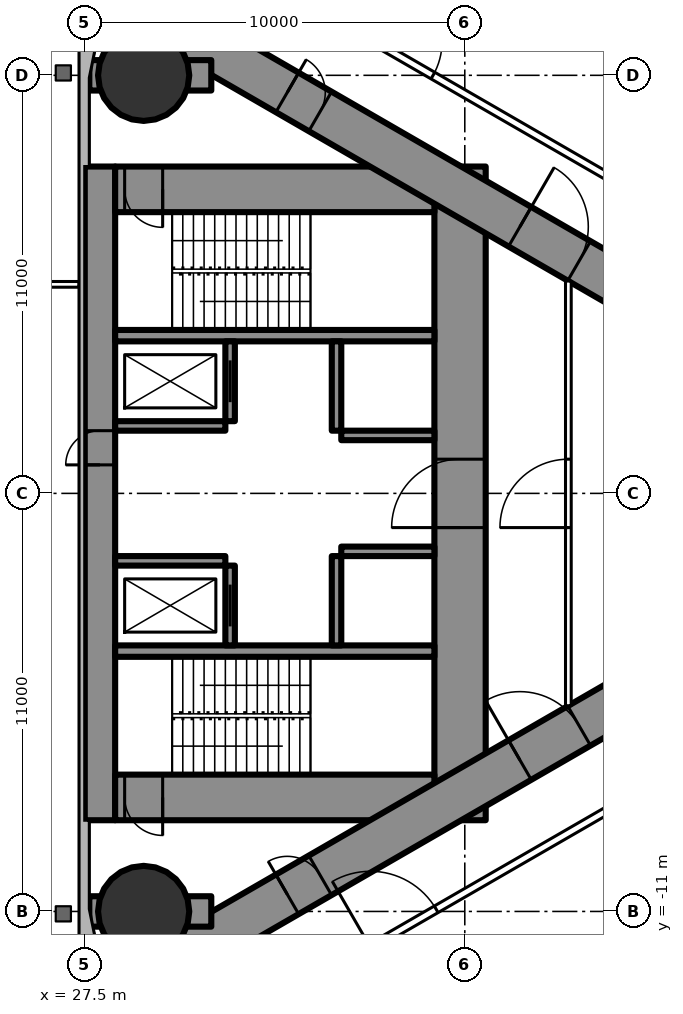
"""IFC4 building model, lengths in metres.
Left out: names, types, materials, properties, quantities, classifications, styles, units other than length and angle.
Written with IfcOpenShell. Run it as: python <this file> out.ifc"""

import sys

from ifc_helpers import new_model, si_unit, direction, frame, frame_2d, origin, origin_2d, place, context, subcontext, project, spatial, rectangle, hollow_circle, extrude, element, fill, save


model = new_model("IFC4")
c1 = context("Model", 3, precision=1e-05, world=origin(), true_north=direction((0.0, 1.0)))
c2 = subcontext(c1, "Body", "Model", "MODEL_VIEW")
j1 = project(units=[si_unit("LENGTHUNIT", "METRE"), si_unit("PLANEANGLEUNIT", "RADIAN")], contexts=[c1])
p1 = place(None, origin())
s1 = spatial("IfcSite", under=j1, at=p1, CompositionType="ELEMENT")
p2 = place(p1, origin())
s2 = spatial("IfcBuilding", under=s1, at=p2, CompositionType="ELEMENT")
p3 = place(p2, frame((0.0, 0.0, 210.3)))
s3 = spatial("IfcBuildingStorey", under=s2, at=p3, CompositionType="ELEMENT", Elevation=210.3)
for number, where, z_axis, x_axis in (
    (1, (29.05, 11.0, 0.0), (0.0, 0.0, 1.0), (1.0, 0.0, 0.0)),
    (2, (29.05, -11.0, 0.0), (0.0, 0.0, 1.0), (1.0, 0.0, 0.0)),
):
    element("IfcColumn", number, at=place(p3, frame(where, z_axis=z_axis, x_axis=x_axis)), inside=s3, PredefinedType="COLUMN", context=c2, shape_type="SweptSolid", body=[
        extrude(hollow_circle(Radius=1.2, WallThickness=0.09, at=origin_2d()), origin(), (0.0, 0.0, 1.0), 5.0),
    ])
p4 = place(p3, frame((27.9, -8.6, 0.0), z_axis=(0.0, 0.0, 1.0), x_axis=(0.0, 1.0, 0.0)))
e3 = element("IfcWall", 3, at=p4, inside=s3, PredefinedType="SHEAR", context=c2, shape_type="SweptSolid", body=[
    extrude(rectangle(XDim=17.2, YDim=0.8, at=frame_2d((8.6, 0.0))), origin(), (0.0, 0.0, 1.0), 5.0),
])
p5 = place(p4, frame((9.35, 0.0, 0.0)))
e4 = element("IfcOpeningElement", 4, at=p5, cuts=e3, PredefinedType="OPENING", context=c2, shape_type="SweptSolid", body=[
    extrude(rectangle(XDim=0.9, YDim=2.2, at=frame_2d((0.45, 1.1))), frame((0.0, 0.41, 0.0), z_axis=(0.0, -1.0, 0.0), x_axis=(1.0, 0.0, 0.0)), (0.0, 0.0, 1.0), 0.82),
])
p6 = place(p3, frame((37.375, -8.6, 0.0), z_axis=(0.0, 0.0, 1.0), x_axis=(0.0, 1.0, 0.0)))
e5 = element("IfcWall", 5, at=p6, inside=s3, PredefinedType="SHEAR", context=c2, shape_type="SweptSolid", body=[
    extrude(rectangle(XDim=17.2, YDim=1.35, at=frame_2d((8.6, 0.0))), origin(), (0.0, 0.0, 1.0), 5.0),
])
p7 = place(p6, frame((7.7, 0.0, 0.0)))
e6 = element("IfcOpeningElement", 6, at=p7, cuts=e5, PredefinedType="OPENING", context=c2, shape_type="SweptSolid", body=[
    extrude(rectangle(XDim=1.8, YDim=2.2, at=frame_2d((0.9, 1.1))), frame((0.0, 0.685, 0.0), z_axis=(0.0, -1.0, 0.0), x_axis=(1.0, 0.0, 0.0)), (0.0, 0.0, 1.0), 1.37),
])
p8 = place(p3, frame((28.3, -8.0, 0.0), z_axis=(0.0, 0.0, 1.0), x_axis=(1.0, 0.0, 0.0)))
e7 = element("IfcWall", 7, at=p8, inside=s3, PredefinedType="SHEAR", context=c2, shape_type="SweptSolid", body=[
    extrude(rectangle(XDim=8.4, YDim=1.2, at=frame_2d((4.2, 0.0))), origin(), (0.0, 0.0, 1.0), 5.0),
])
p9 = place(p8, frame((0.25, 0.0, 0.0)))
e8 = element("IfcOpeningElement", 8, at=p9, cuts=e7, PredefinedType="OPENING", context=c2, shape_type="SweptSolid", body=[
    extrude(rectangle(XDim=1.0, YDim=2.2, at=frame_2d((0.5, 1.1))), frame((0.0, 0.61, 0.0), z_axis=(0.0, -1.0, 0.0), x_axis=(1.0, 0.0, 0.0)), (0.0, 0.0, 1.0), 1.22),
])
p10 = place(p3, frame((28.3, 8.0, 0.0), z_axis=(0.0, 0.0, 1.0), x_axis=(1.0, 0.0, 0.0)))
e9 = element("IfcWall", 9, at=p10, inside=s3, PredefinedType="SHEAR", context=c2, shape_type="SweptSolid", body=[
    extrude(rectangle(XDim=8.4, YDim=1.2, at=frame_2d((4.2, 0.0))), origin(), (0.0, 0.0, 1.0), 5.0),
])
p11 = place(p10, frame((0.25, 0.0, 0.0)))
e10 = element("IfcOpeningElement", 10, at=p11, cuts=e9, PredefinedType="OPENING", context=c2, shape_type="SweptSolid", body=[
    extrude(rectangle(XDim=1.0, YDim=2.2, at=frame_2d((0.5, 1.1))), frame((0.0, 0.61, 0.0), z_axis=(0.0, -1.0, 0.0), x_axis=(1.0, 0.0, 0.0)), (0.0, 0.0, 1.0), 1.22),
])
for number, where, z_axis, x_axis in (
    (11, (28.3, -4.15, 0.0), (0.0, 0.0, 1.0), (1.0, 0.0, 0.0)),
    (12, (28.3, 4.15, 0.0), (0.0, 0.0, 1.0), (1.0, 0.0, 0.0)),
):
    element("IfcWall", number, at=place(p3, frame(where, z_axis=z_axis, x_axis=x_axis)), inside=s3, PredefinedType="SHEAR", context=c2, shape_type="SweptSolid", body=[
        extrude(rectangle(XDim=8.4, YDim=0.3, at=frame_2d((4.2, 0.0))), origin(), (0.0, 0.0, 1.0), 5.0),
    ])
p12 = place(p3, frame((31.325, -4.0, 0.0), z_axis=(0.0, 0.0, 1.0), x_axis=(0.0, 1.0, 0.0)))
e13 = element("IfcWall", 13, at=p12, inside=s3, PredefinedType="SHEAR", context=c2, shape_type="SweptSolid", body=[
    extrude(rectangle(XDim=2.1, YDim=0.25, at=frame_2d((1.05, 0.0))), origin(), (0.0, 0.0, 1.0), 5.0),
])
p13 = place(p12, frame((0.5, 0.0, 0.0)))
e14 = element("IfcOpeningElement", 14, at=p13, cuts=e13, PredefinedType="OPENING", context=c2, shape_type="SweptSolid", body=[
    extrude(rectangle(XDim=1.1, YDim=2.2, at=frame_2d((0.55, 1.1))), frame((0.0, 0.135, 0.0), z_axis=(0.0, -1.0, 0.0), x_axis=(1.0, 0.0, 0.0)), (0.0, 0.0, 1.0), 0.27),
])
p14 = place(p3, frame((34.125, -4.0, 0.0), z_axis=(0.0, 0.0, 1.0), x_axis=(0.0, 1.0, 0.0)))
e15 = element("IfcWall", 15, at=p14, inside=s3, PredefinedType="SHEAR", context=c2, shape_type="SweptSolid", body=[
    extrude(rectangle(XDim=2.35, YDim=0.25, at=frame_2d((1.175, 0.0))), origin(), (0.0, 0.0, 1.0), 5.0),
])
p15 = place(p3, frame((28.3, -1.775, 0.0), z_axis=(0.0, 0.0, 1.0), x_axis=(1.0, 0.0, 0.0)))
e16 = element("IfcWall", 16, at=p15, inside=s3, PredefinedType="SHEAR", context=c2, shape_type="SweptSolid", body=[
    extrude(rectangle(XDim=2.9, YDim=0.25, at=frame_2d((1.45, 0.0))), origin(), (0.0, 0.0, 1.0), 5.0),
])
p16 = place(p3, frame((34.25, -1.525, 0.0), z_axis=(0.0, 0.0, 1.0), x_axis=(1.0, 0.0, 0.0)))
e17 = element("IfcWall", 17, at=p16, inside=s3, PredefinedType="SHEAR", context=c2, shape_type="SweptSolid", body=[
    extrude(rectangle(XDim=2.45, YDim=0.25, at=frame_2d((1.225, 0.0))), origin(), (0.0, 0.0, 1.0), 5.0),
])
p17 = place(p3, frame((31.325, 1.9, 0.0), z_axis=(0.0, 0.0, 1.0), x_axis=(0.0, 1.0, 0.0)))
e18 = element("IfcWall", 18, at=p17, inside=s3, PredefinedType="SHEAR", context=c2, shape_type="SweptSolid", body=[
    extrude(rectangle(XDim=2.1, YDim=0.25, at=frame_2d((1.05, 0.0))), origin(), (0.0, 0.0, 1.0), 5.0),
])
p18 = place(p17, frame((0.5, 0.0, 0.0)))
e19 = element("IfcOpeningElement", 19, at=p18, cuts=e18, PredefinedType="OPENING", context=c2, shape_type="SweptSolid", body=[
    extrude(rectangle(XDim=1.1, YDim=2.2, at=frame_2d((0.55, 1.1))), frame((0.0, 0.135, 0.0), z_axis=(0.0, -1.0, 0.0), x_axis=(1.0, 0.0, 0.0)), (0.0, 0.0, 1.0), 0.27),
])
p19 = place(p3, frame((34.125, 1.65, 0.0), z_axis=(0.0, 0.0, 1.0), x_axis=(0.0, 1.0, 0.0)))
e20 = element("IfcWall", 20, at=p19, inside=s3, PredefinedType="SHEAR", context=c2, shape_type="SweptSolid", body=[
    extrude(rectangle(XDim=2.35, YDim=0.25, at=frame_2d((1.175, 0.0))), origin(), (0.0, 0.0, 1.0), 5.0),
])
p20 = place(p3, frame((28.3, 1.775, 0.0), z_axis=(0.0, 0.0, 1.0), x_axis=(1.0, 0.0, 0.0)))
e21 = element("IfcWall", 21, at=p20, inside=s3, PredefinedType="SHEAR", context=c2, shape_type="SweptSolid", body=[
    extrude(rectangle(XDim=2.9, YDim=0.25, at=frame_2d((1.45, 0.0))), origin(), (0.0, 0.0, 1.0), 5.0),
])
p21 = place(p3, frame((34.25, 1.525, 0.0), z_axis=(0.0, 0.0, 1.0), x_axis=(1.0, 0.0, 0.0)))
e22 = element("IfcWall", 22, at=p21, inside=s3, PredefinedType="SHEAR", context=c2, shape_type="SweptSolid", body=[
    extrude(rectangle(XDim=2.45, YDim=0.25, at=frame_2d((1.225, 0.0))), origin(), (0.0, 0.0, 1.0), 5.0),
])
p22 = place(p3, frame((27.2, -13.8, 0.0), z_axis=(0.0, 0.0, 1.0), x_axis=(0.866027159892, 0.499996958321, 0.0)))
e23 = element("IfcWall", 23, at=p22, inside=s3, PredefinedType="SHEAR", context=c2, shape_type="SweptSolid", body=[
    extrude(rectangle(XDim=27.947, YDim=1.2, at=frame_2d((13.973, 0.0))), origin(), (0.0, 0.0, 1.0), 5.0),
])
p23 = place(p22, frame((6.5, 0.0, 0.0)))
e24 = element("IfcOpeningElement", 24, at=p23, cuts=e23, PredefinedType="OPENING", context=c2, shape_type="SweptSolid", body=[
    extrude(rectangle(XDim=1.0, YDim=2.2, at=frame_2d((0.5, 1.1))), frame((0.0, 0.61, 0.0), z_axis=(0.0, -1.0, 0.0), x_axis=(1.0, 0.0, 0.0)), (0.0, 0.0, 1.0), 1.22),
])
p24 = place(p22, frame((13.568, 0.0, 0.0)))
e25 = element("IfcOpeningElement", 25, at=p24, cuts=e23, PredefinedType="OPENING", context=c2, shape_type="SweptSolid", body=[
    extrude(rectangle(XDim=1.8, YDim=2.2, at=frame_2d((0.9, 1.1))), frame((0.0, 0.61, 0.0), z_axis=(0.0, -1.0, 0.0), x_axis=(1.0, 0.0, 0.0)), (0.0, 0.0, 1.0), 1.22),
])
p25 = place(p3, frame((27.2, 13.8, 0.0), z_axis=(0.0, 0.0, 1.0), x_axis=(0.866024515034, -0.500001539357, 0.0)))
e26 = element("IfcWall", 26, at=p25, inside=s3, PredefinedType="SHEAR", context=c2, shape_type="SweptSolid", body=[
    extrude(rectangle(XDim=26.907, YDim=1.2, at=frame_2d((13.454, 0.0))), origin(), (0.0, 0.0, 1.0), 5.0),
])
p26 = place(p25, frame((6.5, 0.0, 0.0)))
e27 = element("IfcOpeningElement", 27, at=p26, cuts=e26, PredefinedType="OPENING", context=c2, shape_type="SweptSolid", body=[
    extrude(rectangle(XDim=1.0, YDim=2.2, at=frame_2d((0.5, 1.1))), frame((0.0, 0.61, 0.0), z_axis=(0.0, -1.0, 0.0), x_axis=(1.0, 0.0, 0.0)), (0.0, 0.0, 1.0), 1.22),
])
p27 = place(p25, frame((13.568, 0.0, 0.0)))
e28 = element("IfcOpeningElement", 28, at=p27, cuts=e26, PredefinedType="OPENING", context=c2, shape_type="SweptSolid", body=[
    extrude(rectangle(XDim=1.8, YDim=2.2, at=frame_2d((0.9, 1.1))), frame((0.0, 0.61, 0.0), z_axis=(0.0, -1.0, 0.0), x_axis=(1.0, 0.0, 0.0)), (0.0, 0.0, 1.0), 1.22),
])
for number, where, z_axis, x_axis in (
    (29, (27.62, -11.0, 0.0), (0.0, 0.0, 1.0), (1.0, 0.0, 0.0)),
    (30, (27.62, 11.0, 0.0), (0.0, 0.0, 1.0), (1.0, 0.0, 0.0)),
):
    element("IfcWall", number, at=place(p3, frame(where, z_axis=z_axis, x_axis=x_axis)), inside=s3, PredefinedType="SHEAR", context=c2, shape_type="SweptSolid", body=[
        extrude(rectangle(XDim=3.209, YDim=0.8, at=frame_2d((1.605, 0.0))), origin(), (0.0, 0.0, 1.0), 5.0),
    ])
p28 = place(p3, frame((28.959, -15.44, 0.0), z_axis=(0.0, 0.0, 1.0), x_axis=(0.866025227435, 0.500000305447, 0.0)))
e31 = element("IfcWall", 31, at=p28, inside=s3, PredefinedType="PARTITIONING", context=c2, shape_type="SweptSolid", body=[
    extrude(rectangle(XDim=30.88, YDim=0.2, at=frame_2d((15.44, 0.0))), origin(), (0.0, 0.0, 1.0), 4.75),
])
p29 = place(p28, frame((6.994, 0.0, 0.0)))
e32 = element("IfcOpeningElement", 32, at=p29, cuts=e31, PredefinedType="OPENING", context=c2, shape_type="SweptSolid", body=[
    extrude(rectangle(XDim=2.0, YDim=2.4, at=frame_2d((1.0, 1.2))), frame((0.0, 0.11, 0.0), z_axis=(0.0, -1.0, 0.0), x_axis=(1.0, 0.0, 0.0)), (0.0, 0.0, 1.0), 0.22),
])
p30 = place(p28, frame((16.36, 0.0, 0.0)))
e33 = element("IfcOpeningElement", 33, at=p30, cuts=e31, PredefinedType="OPENING", context=c2, shape_type="SweptSolid", body=[
    extrude(rectangle(XDim=1.8, YDim=2.2, at=frame_2d((0.9, 1.1))), frame((0.0, 0.11, 0.0), z_axis=(0.0, -1.0, 0.0), x_axis=(1.0, 0.0, 0.0)), (0.0, 0.0, 1.0), 0.22),
])
p31 = place(p28, frame((21.118, 0.0, 0.0)))
e34 = element("IfcOpeningElement", 34, at=p31, cuts=e31, PredefinedType="OPENING", context=c2, shape_type="SweptSolid", body=[
    extrude(rectangle(XDim=1.8, YDim=2.2, at=frame_2d((0.9, 1.1))), frame((0.0, 0.11, 0.0), z_axis=(0.0, -1.0, 0.0), x_axis=(1.0, 0.0, 0.0)), (0.0, 0.0, 1.0), 0.22),
])
p32 = place(p28, frame((25.341, 0.0, 0.0)))
e35 = element("IfcOpeningElement", 35, at=p32, cuts=e31, PredefinedType="OPENING", context=c2, shape_type="SweptSolid", body=[
    extrude(rectangle(XDim=1.8, YDim=2.2, at=frame_2d((0.9, 1.1))), frame((0.0, 0.11, 0.0), z_axis=(0.0, -1.0, 0.0), x_axis=(1.0, 0.0, 0.0)), (0.0, 0.0, 1.0), 0.22),
])
p33 = place(p3, frame((28.959, 15.44, 0.0), z_axis=(0.0, 0.0, 1.0), x_axis=(0.866028936079, -0.499993881836, 0.0)))
e36 = element("IfcWall", 36, at=p33, inside=s3, PredefinedType="PARTITIONING", context=c2, shape_type="SweptSolid", body=[
    extrude(rectangle(XDim=20.503, YDim=0.2, at=frame_2d((10.251, 0.0))), origin(), (0.0, 0.0, 1.0), 4.75),
])
p34 = place(p33, frame((16.26, 0.0, 0.0)))
e37 = element("IfcOpeningElement", 37, at=p34, cuts=e36, PredefinedType="OPENING", context=c2, shape_type="SweptSolid", body=[
    extrude(rectangle(XDim=2.0, YDim=2.4, at=frame_2d((1.0, 1.2))), frame((0.0, 0.11, 0.0), z_axis=(0.0, -1.0, 0.0), x_axis=(1.0, 0.0, 0.0)), (0.0, 0.0, 1.0), 0.22),
])
p35 = place(p33, frame((7.094, 0.0, 0.0)))
e38 = element("IfcOpeningElement", 38, at=p35, cuts=e36, PredefinedType="OPENING", context=c2, shape_type="SweptSolid", body=[
    extrude(rectangle(XDim=1.8, YDim=2.2, at=frame_2d((0.9, 1.1))), frame((0.0, 0.11, 0.0), z_axis=(0.0, -1.0, 0.0), x_axis=(1.0, 0.0, 0.0)), (0.0, 0.0, 1.0), 0.22),
])
p36 = place(p3, frame((40.225, -5.587, 0.0), z_axis=(0.0, 0.0, 1.0), x_axis=(0.0, 1.0, 0.0)))
e39 = element("IfcWall", 39, at=p36, inside=s3, PredefinedType="PARTITIONING", context=c2, shape_type="SweptSolid", body=[
    extrude(rectangle(XDim=11.174, YDim=0.15, at=frame_2d((5.587, 0.0))), origin(), (0.0, 0.0, 1.0), 4.75),
])
p37 = place(p36, frame((4.687, 0.0, 0.0)))
e40 = element("IfcOpeningElement", 40, at=p37, cuts=e39, PredefinedType="OPENING", context=c2, shape_type="SweptSolid", body=[
    extrude(rectangle(XDim=1.8, YDim=2.2, at=frame_2d((0.9, 1.1))), frame((0.0, 0.085, 0.0), z_axis=(0.0, -1.0, 0.0), x_axis=(1.0, 0.0, 0.0)), (0.0, 0.0, 1.0), 0.17),
])
p38 = place(p3, frame((26.5, 5.5, 0.0), z_axis=(0.0, 0.0, 1.0), x_axis=(1.0, 0.0, 0.0)))
e41 = element("IfcWall", 41, at=p38, inside=s3, PredefinedType="PARTITIONING", context=c2, shape_type="SweptSolid", body=[
    extrude(rectangle(XDim=0.85, YDim=0.15, at=frame_2d((0.425, 0.0))), origin(), (0.0, 0.0, 1.0), 3.8),
])
p39 = place(p29, origin())
e42 = element("IfcDoor", 42, at=p39, inside=s3, OperationType="DOUBLE_DOOR_SINGLE_SWING", PredefinedType="DOOR", context=c2, shape_type="SweptSolid", body=[
    extrude(rectangle(XDim=2.0, YDim=2.4, at=frame_2d((1.0, 1.2))), frame((0.0, 0.025, 0.0), z_axis=(0.0, -1.0, 0.0), x_axis=(1.0, 0.0, 0.0)), (0.0, 0.0, 1.0), 0.05),
])
fill(e32, e42)
p40 = place(p35, origin())
e43 = element("IfcDoor", 43, at=p40, inside=s3, OperationType="DOUBLE_DOOR_SINGLE_SWING", PredefinedType="DOOR", context=c2, shape_type="SweptSolid", body=[
    extrude(rectangle(XDim=1.8, YDim=2.2, at=frame_2d((0.9, 1.1))), frame((0.0, 0.025, 0.0), z_axis=(0.0, -1.0, 0.0), x_axis=(1.0, 0.0, 0.0)), (0.0, 0.0, 1.0), 0.05),
])
fill(e38, e43)
p41 = place(p37, origin())
e44 = element("IfcDoor", 44, at=p41, inside=s3, OperationType="DOUBLE_DOOR_SINGLE_SWING", PredefinedType="DOOR", context=c2, shape_type="SweptSolid", body=[
    extrude(rectangle(XDim=1.8, YDim=2.2, at=frame_2d((0.9, 1.1))), frame((0.0, 0.025, 0.0), z_axis=(0.0, -1.0, 0.0), x_axis=(1.0, 0.0, 0.0)), (0.0, 0.0, 1.0), 0.05),
])
fill(e40, e44)
p42 = place(p23, origin())
e45 = element("IfcDoor", 45, at=p42, inside=s3, OperationType="SINGLE_SWING_LEFT", PredefinedType="DOOR", context=c2, shape_type="SweptSolid", body=[
    extrude(rectangle(XDim=1.0, YDim=2.2, at=frame_2d((0.5, 1.1))), frame((0.0, 0.025, 0.0), z_axis=(0.0, -1.0, 0.0), x_axis=(1.0, 0.0, 0.0)), (0.0, 0.0, 1.0), 0.05),
])
fill(e24, e45)
p43 = place(p24, origin())
e46 = element("IfcDoor", 46, at=p43, inside=s3, OperationType="DOUBLE_DOOR_SINGLE_SWING", PredefinedType="DOOR", context=c2, shape_type="SweptSolid", body=[
    extrude(rectangle(XDim=1.8, YDim=2.2, at=frame_2d((0.9, 1.1))), frame((0.0, 0.025, 0.0), z_axis=(0.0, -1.0, 0.0), x_axis=(1.0, 0.0, 0.0)), (0.0, 0.0, 1.0), 0.05),
])
fill(e25, e46)
p44 = place(p26, origin())
e47 = element("IfcDoor", 47, at=p44, inside=s3, OperationType="SINGLE_SWING_LEFT", PredefinedType="DOOR", context=c2, shape_type="SweptSolid", body=[
    extrude(rectangle(XDim=1.0, YDim=2.2, at=frame_2d((0.5, 1.1))), frame((0.0, 0.025, 0.0), z_axis=(0.0, -1.0, 0.0), x_axis=(1.0, 0.0, 0.0)), (0.0, 0.0, 1.0), 0.05),
])
fill(e27, e47)
p45 = place(p27, origin())
e48 = element("IfcDoor", 48, at=p45, inside=s3, OperationType="DOUBLE_DOOR_SINGLE_SWING", PredefinedType="DOOR", context=c2, shape_type="SweptSolid", body=[
    extrude(rectangle(XDim=1.8, YDim=2.2, at=frame_2d((0.9, 1.1))), frame((0.0, 0.025, 0.0), z_axis=(0.0, -1.0, 0.0), x_axis=(1.0, 0.0, 0.0)), (0.0, 0.0, 1.0), 0.05),
])
fill(e28, e48)
p46 = place(p7, origin())
e49 = element("IfcDoor", 49, at=p46, inside=s3, OperationType="DOUBLE_DOOR_SINGLE_SWING", PredefinedType="DOOR", context=c2, shape_type="SweptSolid", body=[
    extrude(rectangle(XDim=1.8, YDim=2.2, at=frame_2d((0.9, 1.1))), frame((0.0, 0.025, 0.0), z_axis=(0.0, -1.0, 0.0), x_axis=(1.0, 0.0, 0.0)), (0.0, 0.0, 1.0), 0.05),
])
fill(e6, e49)
p47 = place(p9, origin())
e50 = element("IfcDoor", 50, at=p47, inside=s3, OperationType="SINGLE_SWING_RIGHT", PredefinedType="DOOR", context=c2, shape_type="SweptSolid", body=[
    extrude(rectangle(XDim=1.0, YDim=2.2, at=frame_2d((0.5, 1.1))), frame((0.0, 0.025, 0.0), z_axis=(0.0, -1.0, 0.0), x_axis=(1.0, 0.0, 0.0)), (0.0, 0.0, 1.0), 0.05),
])
fill(e8, e50)
p48 = place(p11, origin())
e51 = element("IfcDoor", 51, at=p48, inside=s3, OperationType="SINGLE_SWING_RIGHT", PredefinedType="DOOR", context=c2, shape_type="SweptSolid", body=[
    extrude(rectangle(XDim=1.0, YDim=2.2, at=frame_2d((0.5, 1.1))), frame((0.0, 0.025, 0.0), z_axis=(0.0, -1.0, 0.0), x_axis=(1.0, 0.0, 0.0)), (0.0, 0.0, 1.0), 0.05),
])
fill(e10, e51)
p49 = place(p5, origin())
e52 = element("IfcDoor", 52, at=p49, inside=s3, OperationType="SINGLE_SWING_LEFT", PredefinedType="DOOR", context=c2, shape_type="SweptSolid", body=[
    extrude(rectangle(XDim=0.9, YDim=2.2, at=frame_2d((0.45, 1.1))), frame((0.0, 0.025, 0.0), z_axis=(0.0, -1.0, 0.0), x_axis=(1.0, 0.0, 0.0)), (0.0, 0.0, 1.0), 0.05),
])
fill(e4, e52)
p50 = place(p13, origin())
e53 = element("IfcDoor", 53, at=p50, inside=s3, OperationType="SLIDING_TO_LEFT", PredefinedType="USERDEFINED", context=c2, shape_type="SweptSolid", body=[
    extrude(rectangle(XDim=1.1, YDim=2.2, at=frame_2d((0.55, 1.1))), frame((0.0, 0.025, 0.0), z_axis=(0.0, -1.0, 0.0), x_axis=(1.0, 0.0, 0.0)), (0.0, 0.0, 1.0), 0.05),
])
fill(e14, e53)
p51 = place(p18, origin())
e54 = element("IfcDoor", 54, at=p51, inside=s3, OperationType="SLIDING_TO_LEFT", PredefinedType="USERDEFINED", context=c2, shape_type="SweptSolid", body=[
    extrude(rectangle(XDim=1.1, YDim=2.2, at=frame_2d((0.55, 1.1))), frame((0.0, 0.025, 0.0), z_axis=(0.0, -1.0, 0.0), x_axis=(1.0, 0.0, 0.0)), (0.0, 0.0, 1.0), 0.05),
])
fill(e19, e54)
save(model, sys.argv[1])
